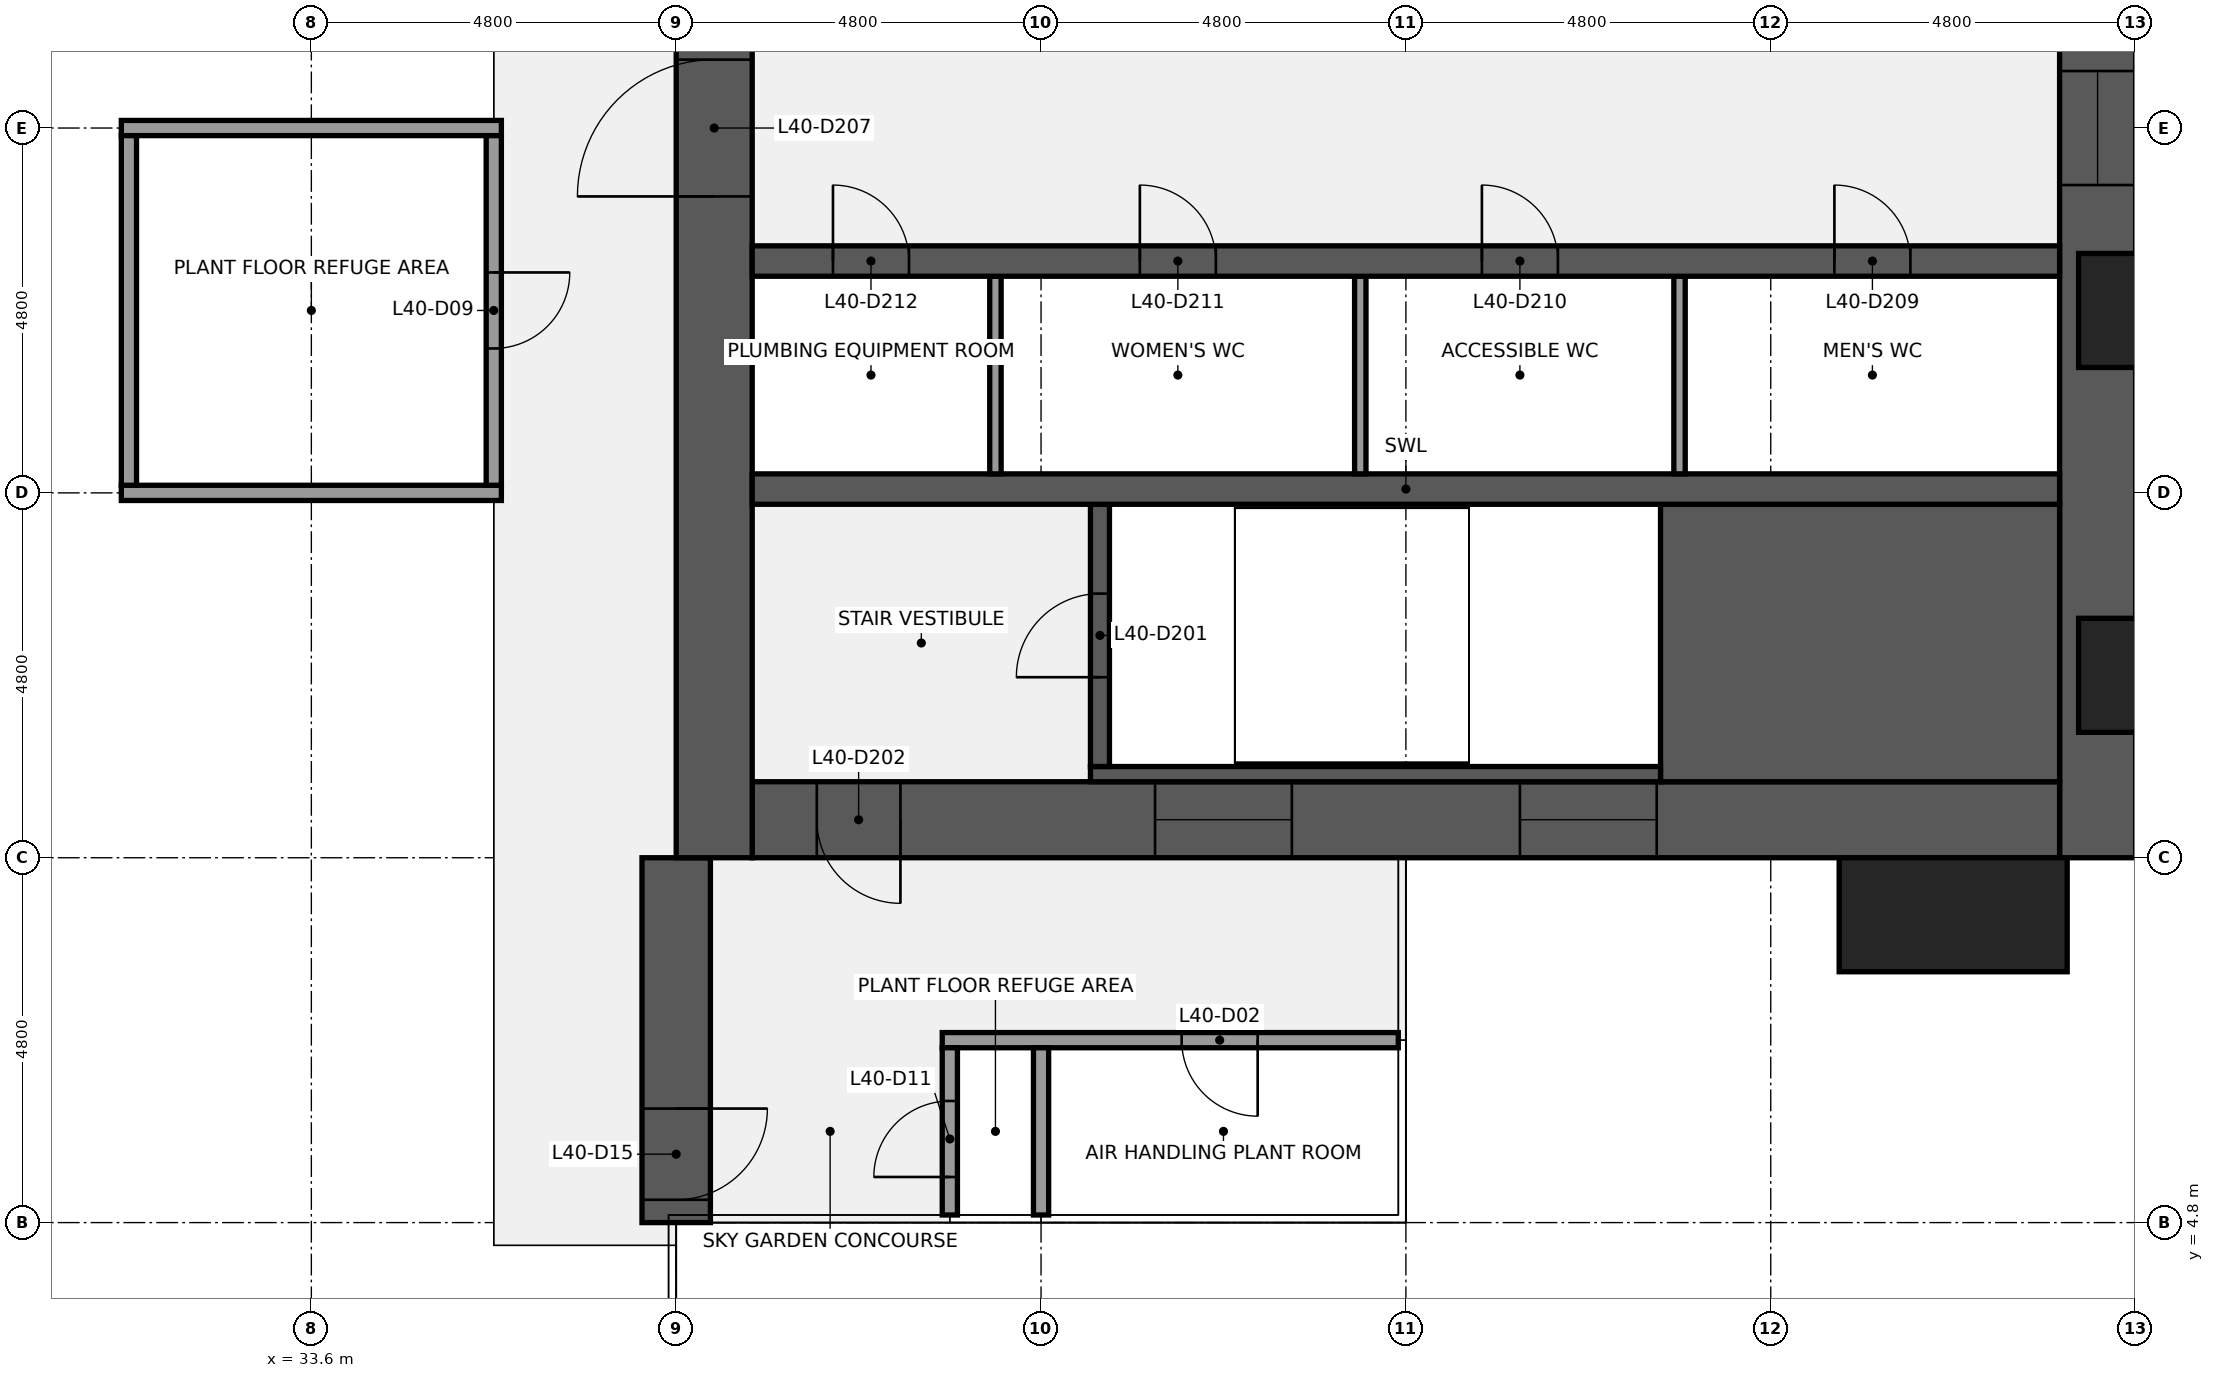
"""IFC4 building model, lengths in metres.
Left out: names, types, materials, properties, quantities, classifications, styles, units other than length and angle.
Written with IfcOpenShell. Run it as: python <this file> out.ifc"""

import sys

from ifc_helpers import new_model, si_unit, direction, frame, frame_2d, origin, origin_2d, place, context, subcontext, project, spatial, rectangle, extrude, element, fill, save


model = new_model("IFC4")
c1 = context("Model", 3, precision=1e-05, world=origin(), true_north=direction((0.0, 1.0)))
c2 = subcontext(c1, "Body", "Model", "MODEL_VIEW")
j1 = project(units=[si_unit("LENGTHUNIT", "METRE"), si_unit("PLANEANGLEUNIT", "RADIAN")], contexts=[c1])
p1 = place(None, origin())
s1 = spatial("IfcSite", under=j1, at=p1, CompositionType="ELEMENT")
p2 = place(p1, origin())
s2 = spatial("IfcBuilding", under=s1, at=p2, CompositionType="ELEMENT")
p3 = place(p2, frame((0.0, 0.0, 180.6)))
s3 = spatial("IfcBuildingStorey", under=s2, at=p3, CompositionType="ELEMENT", Elevation=180.6)
p4 = place(p3, frame((38.4, 4.8, 0.0), z_axis=(0.0, 0.0, 1.0), x_axis=(0.0, 1.0, 0.0)))
e1 = element("IfcWall", 1, at=p4, inside=s3, PredefinedType="SHEAR", context=c2, shape_type="SweptSolid", body=[
    extrude(rectangle(XDim=4.8, YDim=0.9, at=frame_2d((2.4, 0.0))), origin(), (0.0, 0.0, 1.0), 12.3),
])
p5 = place(p4, frame((0.3, 0.0, 0.0)))
e2 = element("IfcOpeningElement", 2, at=p5, cuts=e1, PredefinedType="OPENING", context=c2, shape_type="SweptSolid", body=[
    extrude(rectangle(XDim=1.2, YDim=2.1, at=frame_2d((0.6, 1.05))), frame((0.0, 0.46, 0.0), z_axis=(0.0, -1.0, 0.0), x_axis=(1.0, 0.0, 0.0)), (0.0, 0.0, 1.0), 0.92),
])
p6 = place(p3, frame((57.1, 38.4, 0.0), z_axis=(0.0, 0.0, 1.0), x_axis=(0.0, -1.0, 0.0)))
e3 = element("IfcWall", 3, at=p6, inside=s3, PredefinedType="SHEAR", context=c2, shape_type="SweptSolid", body=[
    extrude(rectangle(XDim=28.8, YDim=1.0, at=frame_2d((14.4, 0.0))), origin(), (0.0, 0.0, 1.0), 12.3),
])
p7 = place(p6, frame((18.45, 0.0, 0.9)))
e4 = element("IfcOpeningElement", 4, at=p7, cuts=e3, PredefinedType="OPENING", context=c2, shape_type="SweptSolid", body=[
    extrude(rectangle(XDim=1.5, YDim=6.3, at=frame_2d((0.75, 3.15))), frame((0.0, 0.51, 0.0), z_axis=(0.0, -1.0, 0.0), x_axis=(1.0, 0.0, 0.0)), (0.0, 0.0, 1.0), 1.02),
])
p8 = place(p6, frame((8.85, 0.0, 0.9)))
e5 = element("IfcOpeningElement", 5, at=p8, cuts=e3, PredefinedType="OPENING", context=c2, shape_type="SweptSolid", body=[
    extrude(rectangle(XDim=1.5, YDim=6.3, at=frame_2d((0.75, 3.15))), frame((0.0, 0.51, 0.0), z_axis=(0.0, -1.0, 0.0), x_axis=(1.0, 0.0, 0.0)), (0.0, 0.0, 1.0), 1.02),
])
p9 = place(p3, frame((56.6, 10.1, 0.0), z_axis=(0.0, 0.0, 1.0), x_axis=(-1.0, 0.0, 0.0)))
e6 = element("IfcWall", 6, at=p9, inside=s3, PredefinedType="SHEAR", context=c2, shape_type="SweptSolid", body=[
    extrude(rectangle(XDim=17.2, YDim=1.0, at=frame_2d((8.6, 0.0))), origin(), (0.0, 0.0, 1.0), 12.3),
])
p10 = place(p9, frame((15.25, 0.0, 0.0)))
e7 = element("IfcOpeningElement", 7, at=p10, cuts=e6, PredefinedType="OPENING", context=c2, shape_type="SweptSolid", body=[
    extrude(rectangle(XDim=1.1, YDim=2.1, at=frame_2d((0.55, 1.05))), frame((0.0, 0.51, 0.0), z_axis=(0.0, -1.0, 0.0), x_axis=(1.0, 0.0, 0.0)), (0.0, 0.0, 1.0), 1.02),
])
p11 = place(p9, frame((5.3, 0.0, 0.9)))
e8 = element("IfcOpeningElement", 8, at=p11, cuts=e6, PredefinedType="OPENING", context=c2, shape_type="SweptSolid", body=[
    extrude(rectangle(XDim=1.8, YDim=1.5, at=frame_2d((0.9, 0.75))), frame((0.0, 0.51, 0.0), z_axis=(0.0, -1.0, 0.0), x_axis=(1.0, 0.0, 0.0)), (0.0, 0.0, 1.0), 1.02),
])
p12 = place(p9, frame((10.1, 0.0, 0.9)))
e9 = element("IfcOpeningElement", 9, at=p12, cuts=e6, PredefinedType="OPENING", context=c2, shape_type="SweptSolid", body=[
    extrude(rectangle(XDim=1.8, YDim=1.5, at=frame_2d((0.9, 0.75))), frame((0.0, 0.51, 0.0), z_axis=(0.0, -1.0, 0.0), x_axis=(1.0, 0.0, 0.0)), (0.0, 0.0, 1.0), 1.02),
])
p13 = place(p3, frame((38.9, 9.6, 0.0), z_axis=(0.0, 0.0, 1.0), x_axis=(0.0, 1.0, 0.0)))
e10 = element("IfcWall", 10, at=p13, inside=s3, PredefinedType="SHEAR", context=c2, shape_type="SweptSolid", body=[
    extrude(rectangle(XDim=28.8, YDim=1.0, at=frame_2d((14.4, 0.0))), origin(), (0.0, 0.0, 1.0), 12.3),
])
p14 = place(p13, frame((8.7, 0.0, 0.0)))
e11 = element("IfcOpeningElement", 11, at=p14, cuts=e10, PredefinedType="OPENING", context=c2, shape_type="SweptSolid", body=[
    extrude(rectangle(XDim=1.8, YDim=2.1, at=frame_2d((0.9, 1.05))), frame((0.0, 0.51, 0.0), z_axis=(0.0, -1.0, 0.0), x_axis=(1.0, 0.0, 0.0)), (0.0, 0.0, 1.0), 1.02),
])
p15 = place(p13, frame((18.3, 0.0, 0.0)))
e12 = element("IfcOpeningElement", 12, at=p15, cuts=e10, PredefinedType="OPENING", context=c2, shape_type="SweptSolid", body=[
    extrude(rectangle(XDim=1.8, YDim=2.1, at=frame_2d((0.9, 1.05))), frame((0.0, 0.51, 0.0), z_axis=(0.0, -1.0, 0.0), x_axis=(1.0, 0.0, 0.0)), (0.0, 0.0, 1.0), 1.02),
])
p16 = place(p3, frame((51.35, 12.425, 0.0), z_axis=(0.0, 0.0, 1.0), x_axis=(1.0, 0.0, 0.0)))
e13 = element("IfcWall", 13, at=p16, inside=s3, PredefinedType="SHEAR", context=c2, shape_type="SweptSolid", body=[
    extrude(rectangle(XDim=5.25, YDim=3.65, at=frame_2d((2.625, 0.0))), origin(), (0.0, 0.0, 1.0), 12.3),
])
p17 = place(p3, frame((43.85, 10.7, 0.0), z_axis=(0.0, 0.0, 1.0), x_axis=(1.0, 0.0, 0.0)))
e14 = element("IfcWall", 14, at=p17, inside=s3, PredefinedType="SHEAR", context=c2, shape_type="SweptSolid", body=[
    extrude(rectangle(XDim=7.5, YDim=0.2, at=frame_2d((3.75, 0.0))), origin(), (0.0, 0.0, 1.0), 12.3),
])
p18 = place(p3, frame((43.975, 10.8, 0.0), z_axis=(0.0, 0.0, 1.0), x_axis=(0.0, 1.0, 0.0)))
e15 = element("IfcWall", 15, at=p18, inside=s3, PredefinedType="SHEAR", context=c2, shape_type="SweptSolid", body=[
    extrude(rectangle(XDim=3.45, YDim=0.25, at=frame_2d((1.725, 0.0))), origin(), (0.0, 0.0, 1.0), 12.3),
])
p19 = place(p18, frame((1.175, 0.0, 0.0)))
e16 = element("IfcOpeningElement", 16, at=p19, cuts=e15, PredefinedType="OPENING", context=c2, shape_type="SweptSolid", body=[
    extrude(rectangle(XDim=1.1, YDim=2.1, at=frame_2d((0.55, 1.05))), frame((0.0, 0.135, 0.0), z_axis=(0.0, -1.0, 0.0), x_axis=(1.0, 0.0, 0.0)), (0.0, 0.0, 1.0), 0.27),
])
p20 = place(p3, frame((39.4, 14.45, 0.0), z_axis=(0.0, 0.0, 1.0), x_axis=(1.0, 0.0, 0.0)))
e17 = element("IfcWall", 17, at=p20, inside=s3, PredefinedType="SHEAR", context=c2, shape_type="SweptSolid", body=[
    extrude(rectangle(XDim=17.2, YDim=0.4, at=frame_2d((8.6, 0.0))), origin(), (0.0, 0.0, 1.0), 12.3),
])
for number, where, z_axis, x_axis in (
    (18, (51.6, 14.65, 0.0), (0.0, 0.0, 1.0), (0.0, 1.0, 0.0)),
    (19, (47.4, 14.65, 0.0), (0.0, 0.0, 1.0), (0.0, 1.0, 0.0)),
    (20, (42.6, 14.65, 0.0), (0.0, 0.0, 1.0), (0.0, 1.0, 0.0)),
):
    element("IfcWall", number, at=place(p3, frame(where, z_axis=z_axis, x_axis=x_axis)), inside=s3, PredefinedType="PARTITIONING", context=c2, shape_type="SweptSolid", body=[
        extrude(rectangle(XDim=2.6, YDim=0.15, at=frame_2d((1.3, 0.0))), origin(), (0.0, 0.0, 1.0), 12.3),
    ])
p21 = place(p3, frame((39.4, 17.45, 0.0), z_axis=(0.0, 0.0, 1.0), x_axis=(1.0, 0.0, 0.0)))
e21 = element("IfcWall", 21, at=p21, inside=s3, PredefinedType="SHEAR", context=c2, shape_type="SweptSolid", body=[
    extrude(rectangle(XDim=17.2, YDim=0.4, at=frame_2d((8.6, 0.0))), origin(), (0.0, 0.0, 1.0), 12.3),
])
p22 = place(p21, frame((14.238, 0.0, 0.0)))
e22 = element("IfcOpeningElement", 22, at=p22, cuts=e21, PredefinedType="OPENING", context=c2, shape_type="SweptSolid", body=[
    extrude(rectangle(XDim=1.0, YDim=2.1, at=frame_2d((0.5, 1.05))), frame((0.0, 0.21, 0.0), z_axis=(0.0, -1.0, 0.0), x_axis=(1.0, 0.0, 0.0)), (0.0, 0.0, 1.0), 0.42),
])
p23 = place(p21, frame((9.6, 0.0, 0.0)))
e23 = element("IfcOpeningElement", 23, at=p23, cuts=e21, PredefinedType="OPENING", context=c2, shape_type="SweptSolid", body=[
    extrude(rectangle(XDim=1.0, YDim=2.1, at=frame_2d((0.5, 1.05))), frame((0.0, 0.21, 0.0), z_axis=(0.0, -1.0, 0.0), x_axis=(1.0, 0.0, 0.0)), (0.0, 0.0, 1.0), 0.42),
])
p24 = place(p21, frame((5.1, 0.0, 0.0)))
e24 = element("IfcOpeningElement", 24, at=p24, cuts=e21, PredefinedType="OPENING", context=c2, shape_type="SweptSolid", body=[
    extrude(rectangle(XDim=1.0, YDim=2.1, at=frame_2d((0.5, 1.05))), frame((0.0, 0.21, 0.0), z_axis=(0.0, -1.0, 0.0), x_axis=(1.0, 0.0, 0.0)), (0.0, 0.0, 1.0), 0.42),
])
p25 = place(p21, frame((1.062, 0.0, 0.0)))
e25 = element("IfcOpeningElement", 25, at=p25, cuts=e21, PredefinedType="OPENING", context=c2, shape_type="SweptSolid", body=[
    extrude(rectangle(XDim=1.0, YDim=2.1, at=frame_2d((0.5, 1.05))), frame((0.0, 0.21, 0.0), z_axis=(0.0, -1.0, 0.0), x_axis=(1.0, 0.0, 0.0)), (0.0, 0.0, 1.0), 0.42),
])
p26 = place(p3, frame((41.9, 7.2, 0.0), z_axis=(0.0, 0.0, 1.0), x_axis=(1.0, 0.0, 0.0)))
e26 = element("IfcWall", 26, at=p26, inside=s3, PredefinedType="PARTITIONING", context=c2, shape_type="SweptSolid", body=[
    extrude(rectangle(XDim=6.0, YDim=0.2, at=frame_2d((3.0, 0.0))), origin(), (0.0, 0.0, 1.0), 11.309),
])
p27 = place(p26, frame((3.15, 0.0, 0.0)))
e27 = element("IfcOpeningElement", 27, at=p27, cuts=e26, PredefinedType="OPENING", context=c2, shape_type="SweptSolid", body=[
    extrude(rectangle(XDim=1.0, YDim=2.1, at=frame_2d((0.5, 1.05))), frame((0.0, 0.11, 0.0), z_axis=(0.0, -1.0, 0.0), x_axis=(1.0, 0.0, 0.0)), (0.0, 0.0, 1.0), 0.22),
])
for number, where, z_axis, x_axis in (
    (28, (31.1, 14.4, 0.0), (0.0, 0.0, 1.0), (1.0, 0.0, 0.0)),
    (29, (31.1, 19.2, 0.0), (0.0, 0.0, 1.0), (1.0, 0.0, 0.0)),
):
    element("IfcWall", number, at=place(p3, frame(where, z_axis=z_axis, x_axis=x_axis)), inside=s3, PredefinedType="PARTITIONING", context=c2, shape_type="SweptSolid", body=[
        extrude(rectangle(XDim=5.0, YDim=0.2, at=frame_2d((2.5, 0.0))), origin(), (0.0, 0.0, 1.0), 11.309),
    ])
p28 = place(p3, frame((31.2, 14.5, 0.0), z_axis=(0.0, 0.0, 1.0), x_axis=(0.0, 1.0, 0.0)))
e30 = element("IfcWall", 30, at=p28, inside=s3, PredefinedType="PARTITIONING", context=c2, shape_type="SweptSolid", body=[
    extrude(rectangle(XDim=4.6, YDim=0.2, at=frame_2d((2.3, 0.0))), origin(), (0.0, 0.0, 1.0), 11.309),
])
p29 = place(p3, frame((36.0, 14.5, 0.0), z_axis=(0.0, 0.0, 1.0), x_axis=(0.0, 1.0, 0.0)))
e31 = element("IfcWall", 31, at=p29, inside=s3, PredefinedType="PARTITIONING", context=c2, shape_type="SweptSolid", body=[
    extrude(rectangle(XDim=4.6, YDim=0.2, at=frame_2d((2.3, 0.0))), origin(), (0.0, 0.0, 1.0), 11.309),
])
p30 = place(p29, frame((1.8, 0.0, 0.0)))
e32 = element("IfcOpeningElement", 32, at=p30, cuts=e31, PredefinedType="OPENING", context=c2, shape_type="SweptSolid", body=[
    extrude(rectangle(XDim=1.0, YDim=2.1, at=frame_2d((0.5, 1.05))), frame((0.0, 0.11, 0.0), z_axis=(0.0, -1.0, 0.0), x_axis=(1.0, 0.0, 0.0)), (0.0, 0.0, 1.0), 0.22),
])
p31 = place(p3, frame((42.0, 4.9, 0.0), z_axis=(0.0, 0.0, 1.0), x_axis=(0.0, 1.0, 0.0)))
e33 = element("IfcWall", 33, at=p31, inside=s3, PredefinedType="PARTITIONING", context=c2, shape_type="SweptSolid", body=[
    extrude(rectangle(XDim=2.2, YDim=0.2, at=frame_2d((1.1, 0.0))), origin(), (0.0, 0.0, 1.0), 11.309),
])
p32 = place(p31, frame((0.5, 0.0, 0.0)))
e34 = element("IfcOpeningElement", 34, at=p32, cuts=e33, PredefinedType="OPENING", context=c2, shape_type="SweptSolid", body=[
    extrude(rectangle(XDim=1.0, YDim=2.1, at=frame_2d((0.5, 1.05))), frame((0.0, 0.11, 0.0), z_axis=(0.0, -1.0, 0.0), x_axis=(1.0, 0.0, 0.0)), (0.0, 0.0, 1.0), 0.22),
])
p33 = place(p3, frame((43.2, 4.9, 0.0), z_axis=(0.0, 0.0, 1.0), x_axis=(0.0, 1.0, 0.0)))
e35 = element("IfcWall", 35, at=p33, inside=s3, PredefinedType="PARTITIONING", context=c2, shape_type="SweptSolid", body=[
    extrude(rectangle(XDim=2.2, YDim=0.2, at=frame_2d((1.1, 0.0))), origin(), (0.0, 0.0, 1.0), 11.309),
])
p34 = place(p3, frame((55.2, 8.85, 0.0), z_axis=(0.0, 0.0, 1.0), x_axis=(1.0, 0.0, 0.0)))
e36 = element("IfcColumn", 36, at=p34, inside=s3, PredefinedType="PILASTER", context=c2, shape_type="SweptSolid", body=[
    extrude(rectangle(XDim=3.0, YDim=1.5, at=origin_2d()), origin(), (0.0, 0.0, 1.0), 12.6),
])
p35 = place(p19, origin())
e37 = element("IfcDoor", 37, at=p35, inside=s3, OperationType="SINGLE_SWING_LEFT", PredefinedType="DOOR", context=c2, shape_type="SweptSolid", body=[
    extrude(rectangle(XDim=1.1, YDim=2.1, at=frame_2d((0.55, 1.05))), frame((0.0, 0.025, 0.0), z_axis=(0.0, -1.0, 0.0), x_axis=(1.0, 0.0, 0.0)), (0.0, 0.0, 1.0), 0.05),
])
fill(e16, e37)
p36 = place(p10, origin())
e38 = element("IfcDoor", 38, at=p36, inside=s3, OperationType="SINGLE_SWING_LEFT", PredefinedType="DOOR", context=c2, shape_type="SweptSolid", body=[
    extrude(rectangle(XDim=1.1, YDim=2.1, at=frame_2d((0.55, 1.05))), frame((0.0, 0.025, 0.0), z_axis=(0.0, -1.0, 0.0), x_axis=(1.0, 0.0, 0.0)), (0.0, 0.0, 1.0), 0.05),
])
fill(e7, e38)
p37 = place(p14, origin())
e39 = element("IfcDoor", 39, at=p37, inside=s3, OperationType="DOUBLE_DOOR_SINGLE_SWING", PredefinedType="DOOR", context=c2, shape_type="SweptSolid", body=[
    extrude(rectangle(XDim=1.8, YDim=2.1, at=frame_2d((0.9, 1.05))), frame((0.0, 0.025, 0.0), z_axis=(0.0, -1.0, 0.0), x_axis=(1.0, 0.0, 0.0)), (0.0, 0.0, 1.0), 0.05),
])
fill(e11, e39)
p38 = place(p22, origin())
e40 = element("IfcDoor", 40, at=p38, inside=s3, OperationType="SINGLE_SWING_LEFT", PredefinedType="DOOR", context=c2, shape_type="SweptSolid", body=[
    extrude(rectangle(XDim=1.0, YDim=2.1, at=frame_2d((0.5, 1.05))), frame((0.0, 0.025, 0.0), z_axis=(0.0, -1.0, 0.0), x_axis=(1.0, 0.0, 0.0)), (0.0, 0.0, 1.0), 0.05),
])
fill(e22, e40)
p39 = place(p23, origin())
e41 = element("IfcDoor", 41, at=p39, inside=s3, OperationType="SINGLE_SWING_LEFT", PredefinedType="DOOR", context=c2, shape_type="SweptSolid", body=[
    extrude(rectangle(XDim=1.0, YDim=2.1, at=frame_2d((0.5, 1.05))), frame((0.0, 0.025, 0.0), z_axis=(0.0, -1.0, 0.0), x_axis=(1.0, 0.0, 0.0)), (0.0, 0.0, 1.0), 0.05),
])
fill(e23, e41)
p40 = place(p24, origin())
e42 = element("IfcDoor", 42, at=p40, inside=s3, OperationType="SINGLE_SWING_LEFT", PredefinedType="DOOR", context=c2, shape_type="SweptSolid", body=[
    extrude(rectangle(XDim=1.0, YDim=2.1, at=frame_2d((0.5, 1.05))), frame((0.0, 0.025, 0.0), z_axis=(0.0, -1.0, 0.0), x_axis=(1.0, 0.0, 0.0)), (0.0, 0.0, 1.0), 0.05),
])
fill(e24, e42)
p41 = place(p25, origin())
e43 = element("IfcDoor", 43, at=p41, inside=s3, OperationType="SINGLE_SWING_LEFT", PredefinedType="DOOR", context=c2, shape_type="SweptSolid", body=[
    extrude(rectangle(XDim=1.0, YDim=2.1, at=frame_2d((0.5, 1.05))), frame((0.0, 0.025, 0.0), z_axis=(0.0, -1.0, 0.0), x_axis=(1.0, 0.0, 0.0)), (0.0, 0.0, 1.0), 0.05),
])
fill(e25, e43)
p42 = place(p7, origin())
e44 = element("IfcWindow", 44, at=p42, inside=s3, PartitioningType="SINGLE_PANEL", PredefinedType="WINDOW", context=c2, shape_type="SweptSolid", body=[
    extrude(rectangle(XDim=1.5, YDim=6.3, at=frame_2d((0.75, 3.15))), frame((0.0, 0.03, 0.0), z_axis=(0.0, -1.0, 0.0), x_axis=(1.0, 0.0, 0.0)), (0.0, 0.0, 1.0), 0.06),
])
fill(e4, e44)
p43 = place(p11, origin())
e45 = element("IfcWindow", 45, at=p43, inside=s3, PartitioningType="SINGLE_PANEL", PredefinedType="WINDOW", context=c2, shape_type="SweptSolid", body=[
    extrude(rectangle(XDim=1.8, YDim=1.5, at=frame_2d((0.9, 0.75))), frame((0.0, 0.03, 0.0), z_axis=(0.0, -1.0, 0.0), x_axis=(1.0, 0.0, 0.0)), (0.0, 0.0, 1.0), 0.06),
])
fill(e8, e45)
p44 = place(p12, origin())
e46 = element("IfcWindow", 46, at=p44, inside=s3, PartitioningType="SINGLE_PANEL", PredefinedType="WINDOW", context=c2, shape_type="SweptSolid", body=[
    extrude(rectangle(XDim=1.8, YDim=1.5, at=frame_2d((0.9, 0.75))), frame((0.0, 0.03, 0.0), z_axis=(0.0, -1.0, 0.0), x_axis=(1.0, 0.0, 0.0)), (0.0, 0.0, 1.0), 0.06),
])
fill(e9, e46)
p45 = place(p27, origin())
e47 = element("IfcDoor", 47, at=p45, inside=s3, OperationType="SINGLE_SWING_RIGHT", PredefinedType="DOOR", context=c2, shape_type="SweptSolid", body=[
    extrude(rectangle(XDim=1.0, YDim=2.1, at=frame_2d((0.5, 1.05))), frame((0.0, 0.025, 0.0), z_axis=(0.0, -1.0, 0.0), x_axis=(1.0, 0.0, 0.0)), (0.0, 0.0, 1.0), 0.05),
])
fill(e27, e47)
p46 = place(p30, origin())
e48 = element("IfcDoor", 48, at=p46, inside=s3, OperationType="SINGLE_SWING_RIGHT", PredefinedType="DOOR", context=c2, shape_type="SweptSolid", body=[
    extrude(rectangle(XDim=1.0, YDim=2.1, at=frame_2d((0.5, 1.05))), frame((0.0, 0.025, 0.0), z_axis=(0.0, -1.0, 0.0), x_axis=(1.0, 0.0, 0.0)), (0.0, 0.0, 1.0), 0.05),
])
fill(e32, e48)
p47 = place(p32, origin())
e49 = element("IfcDoor", 49, at=p47, inside=s3, OperationType="SINGLE_SWING_LEFT", PredefinedType="DOOR", context=c2, shape_type="SweptSolid", body=[
    extrude(rectangle(XDim=1.0, YDim=2.1, at=frame_2d((0.5, 1.05))), frame((0.0, 0.025, 0.0), z_axis=(0.0, -1.0, 0.0), x_axis=(1.0, 0.0, 0.0)), (0.0, 0.0, 1.0), 0.05),
])
fill(e34, e49)
p48 = place(p5, origin())
e50 = element("IfcDoor", 50, at=p48, inside=s3, OperationType="SINGLE_SWING_RIGHT", PredefinedType="DOOR", context=c2, shape_type="SweptSolid", body=[
    extrude(rectangle(XDim=1.2, YDim=2.1, at=frame_2d((0.6, 1.05))), frame((0.0, 0.025, 0.0), z_axis=(0.0, -1.0, 0.0), x_axis=(1.0, 0.0, 0.0)), (0.0, 0.0, 1.0), 0.05),
])
fill(e2, e50)
save(model, sys.argv[1])
